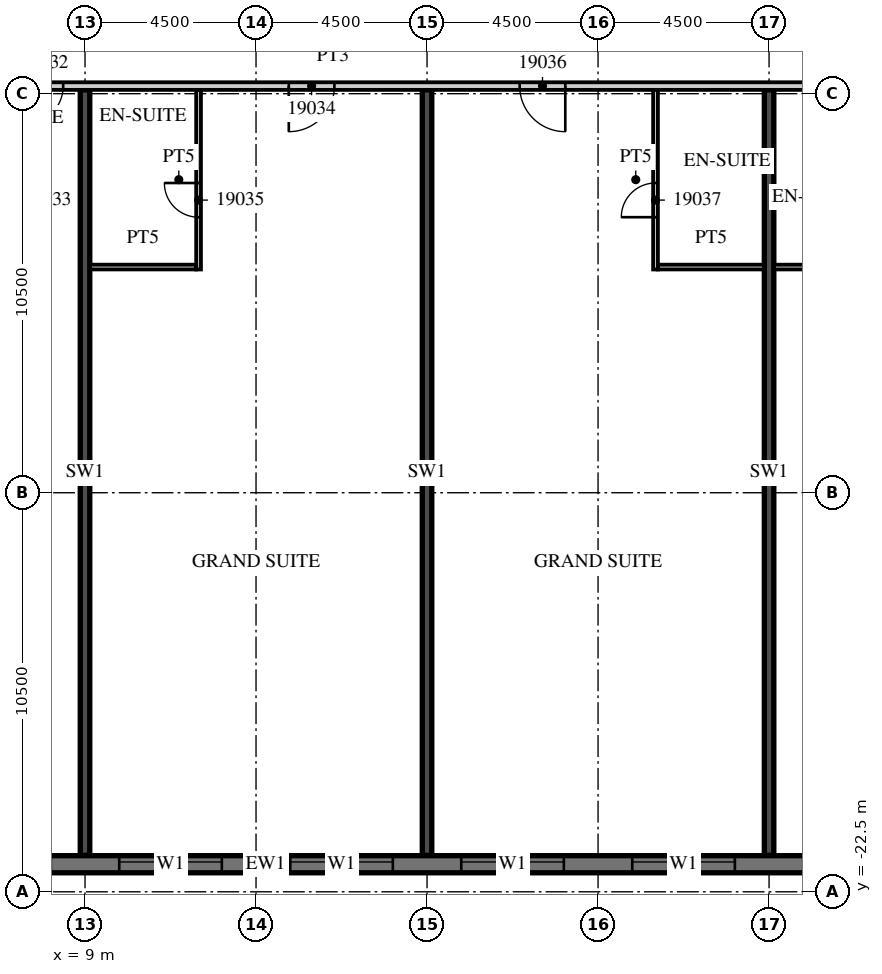
"""IFC4 building model, lengths in metres.
Left out: names, types, materials, properties, quantities, classifications, styles, units other than length and angle.
Written with IfcOpenShell. Run it as: python <this file> out.ifc"""

import sys

from ifc_helpers import new_model, si_unit, direction, frame, frame_2d, origin, place, context, subcontext, project, spatial, rectangle, extrude, element, fill, save


model = new_model("IFC4")
c1 = context("Model", 3, precision=1e-05, world=origin(), true_north=direction((0.0, 1.0)))
c2 = subcontext(c1, "Body", "Model", "MODEL_VIEW")
j1 = project(units=[si_unit("LENGTHUNIT", "METRE"), si_unit("PLANEANGLEUNIT", "RADIAN")], contexts=[c1])
p1 = place(None, origin())
s1 = spatial("IfcSite", under=j1, at=p1, CompositionType="ELEMENT")
p2 = place(p1, origin())
s2 = spatial("IfcBuilding", under=s1, at=p2, CompositionType="ELEMENT")
p3 = place(p2, frame((0.0, 0.0, 93.0)))
s3 = spatial("IfcBuildingStorey", under=s2, at=p3, CompositionType="ELEMENT", Elevation=93.0)
for number, where, z_axis, x_axis in (
    (1, (9.0, -21.54, 0.0), (0.0, 0.0, 1.0), (0.0, 1.0, 0.0)),
    (2, (18.0, -21.54, 0.0), (0.0, 0.0, 1.0), (0.0, 1.0, 0.0)),
    (3, (27.0, -21.54, 0.0), (0.0, 0.0, 1.0), (0.0, 1.0, 0.0)),
):
    element("IfcWall", number, at=place(p3, frame(where, z_axis=z_axis, x_axis=x_axis)), inside=s3, PredefinedType="SHEAR", context=c2, shape_type="SweptSolid", body=[
        extrude(rectangle(XDim=20.14, YDim=0.25, at=frame_2d((10.07, 0.0))), origin(), (0.0, 0.0, 1.0), 3.3),
    ])
p4 = place(p3, frame((-13.5, -21.775, 0.0), z_axis=(0.0, 0.0, 1.0), x_axis=(1.0, 0.0, 0.0)))
e4 = element("IfcWall", 4, at=p4, inside=s3, PredefinedType="SOLIDWALL", context=c2, shape_type="SweptSolid", body=[
    extrude(rectangle(XDim=54.5, YDim=0.45, at=frame_2d((27.25, 0.0))), origin(), (0.0, 0.0, 1.0), 3.02),
])
p5 = place(p4, frame((0.9, 0.0, 0.45)))
e5 = element("IfcOpeningElement", 5, at=p5, cuts=e4, PredefinedType="OPENING", context=c2, shape_type="SweptSolid", body=[
    extrude(rectangle(XDim=2.7, YDim=2.25, at=frame_2d((1.35, 1.125))), frame((0.0, 0.235, 0.0), z_axis=(0.0, -1.0, 0.0), x_axis=(1.0, 0.0, 0.0)), (0.0, 0.0, 1.0), 0.47),
])
p6 = place(p4, frame((5.4, 0.0, 0.45)))
e6 = element("IfcOpeningElement", 6, at=p6, cuts=e4, PredefinedType="OPENING", context=c2, shape_type="SweptSolid", body=[
    extrude(rectangle(XDim=2.7, YDim=2.25, at=frame_2d((1.35, 1.125))), frame((0.0, 0.235, 0.0), z_axis=(0.0, -1.0, 0.0), x_axis=(1.0, 0.0, 0.0)), (0.0, 0.0, 1.0), 0.47),
])
p7 = place(p4, frame((9.9, 0.0, 0.45)))
e7 = element("IfcOpeningElement", 7, at=p7, cuts=e4, PredefinedType="OPENING", context=c2, shape_type="SweptSolid", body=[
    extrude(rectangle(XDim=2.7, YDim=2.25, at=frame_2d((1.35, 1.125))), frame((0.0, 0.235, 0.0), z_axis=(0.0, -1.0, 0.0), x_axis=(1.0, 0.0, 0.0)), (0.0, 0.0, 1.0), 0.47),
])
p8 = place(p4, frame((14.4, 0.0, 0.45)))
e8 = element("IfcOpeningElement", 8, at=p8, cuts=e4, PredefinedType="OPENING", context=c2, shape_type="SweptSolid", body=[
    extrude(rectangle(XDim=2.7, YDim=2.25, at=frame_2d((1.35, 1.125))), frame((0.0, 0.235, 0.0), z_axis=(0.0, -1.0, 0.0), x_axis=(1.0, 0.0, 0.0)), (0.0, 0.0, 1.0), 0.47),
])
p9 = place(p4, frame((18.9, 0.0, 0.45)))
e9 = element("IfcOpeningElement", 9, at=p9, cuts=e4, PredefinedType="OPENING", context=c2, shape_type="SweptSolid", body=[
    extrude(rectangle(XDim=2.7, YDim=2.25, at=frame_2d((1.35, 1.125))), frame((0.0, 0.235, 0.0), z_axis=(0.0, -1.0, 0.0), x_axis=(1.0, 0.0, 0.0)), (0.0, 0.0, 1.0), 0.47),
])
p10 = place(p4, frame((23.4, 0.0, 0.45)))
e10 = element("IfcOpeningElement", 10, at=p10, cuts=e4, PredefinedType="OPENING", context=c2, shape_type="SweptSolid", body=[
    extrude(rectangle(XDim=2.7, YDim=2.25, at=frame_2d((1.35, 1.125))), frame((0.0, 0.235, 0.0), z_axis=(0.0, -1.0, 0.0), x_axis=(1.0, 0.0, 0.0)), (0.0, 0.0, 1.0), 0.47),
])
p11 = place(p4, frame((27.9, 0.0, 0.45)))
e11 = element("IfcOpeningElement", 11, at=p11, cuts=e4, PredefinedType="OPENING", context=c2, shape_type="SweptSolid", body=[
    extrude(rectangle(XDim=2.7, YDim=2.25, at=frame_2d((1.35, 1.125))), frame((0.0, 0.235, 0.0), z_axis=(0.0, -1.0, 0.0), x_axis=(1.0, 0.0, 0.0)), (0.0, 0.0, 1.0), 0.47),
])
p12 = place(p4, frame((32.4, 0.0, 0.45)))
e12 = element("IfcOpeningElement", 12, at=p12, cuts=e4, PredefinedType="OPENING", context=c2, shape_type="SweptSolid", body=[
    extrude(rectangle(XDim=2.7, YDim=2.25, at=frame_2d((1.35, 1.125))), frame((0.0, 0.235, 0.0), z_axis=(0.0, -1.0, 0.0), x_axis=(1.0, 0.0, 0.0)), (0.0, 0.0, 1.0), 0.47),
])
p13 = place(p4, frame((36.9, 0.0, 0.45)))
e13 = element("IfcOpeningElement", 13, at=p13, cuts=e4, PredefinedType="OPENING", context=c2, shape_type="SweptSolid", body=[
    extrude(rectangle(XDim=2.7, YDim=2.25, at=frame_2d((1.35, 1.125))), frame((0.0, 0.235, 0.0), z_axis=(0.0, -1.0, 0.0), x_axis=(1.0, 0.0, 0.0)), (0.0, 0.0, 1.0), 0.47),
])
p14 = place(p4, frame((41.4, 0.0, 0.45)))
e14 = element("IfcOpeningElement", 14, at=p14, cuts=e4, PredefinedType="OPENING", context=c2, shape_type="SweptSolid", body=[
    extrude(rectangle(XDim=2.7, YDim=2.25, at=frame_2d((1.35, 1.125))), frame((0.0, 0.235, 0.0), z_axis=(0.0, -1.0, 0.0), x_axis=(1.0, 0.0, 0.0)), (0.0, 0.0, 1.0), 0.47),
])
p15 = place(p4, frame((45.9, 0.0, 0.45)))
e15 = element("IfcOpeningElement", 15, at=p15, cuts=e4, PredefinedType="OPENING", context=c2, shape_type="SweptSolid", body=[
    extrude(rectangle(XDim=2.7, YDim=2.25, at=frame_2d((1.35, 1.125))), frame((0.0, 0.235, 0.0), z_axis=(0.0, -1.0, 0.0), x_axis=(1.0, 0.0, 0.0)), (0.0, 0.0, 1.0), 0.47),
])
p16 = place(p4, frame((50.4, 0.0, 0.45)))
e16 = element("IfcOpeningElement", 16, at=p16, cuts=e4, PredefinedType="OPENING", context=c2, shape_type="SweptSolid", body=[
    extrude(rectangle(XDim=2.7, YDim=2.25, at=frame_2d((1.35, 1.125))), frame((0.0, 0.235, 0.0), z_axis=(0.0, -1.0, 0.0), x_axis=(1.0, 0.0, 0.0)), (0.0, 0.0, 1.0), 0.47),
])
p17 = place(p3, frame((-13.5, -1.3, 0.0), z_axis=(0.0, 0.0, 1.0), x_axis=(1.0, 0.0, 0.0)))
e17 = element("IfcWall", 17, at=p17, inside=s3, PredefinedType="PARTITIONING", context=c2, shape_type="SweptSolid", body=[
    extrude(rectangle(XDim=58.05, YDim=0.2, at=frame_2d((29.025, 0.0))), origin(), (0.0, 0.0, 1.0), 3.02),
])
p18 = place(p17, frame((0.575, 0.0, 0.0)))
e18 = element("IfcOpeningElement", 18, at=p18, cuts=e17, PredefinedType="OPENING", context=c2, shape_type="SweptSolid", body=[
    extrude(rectangle(XDim=1.0, YDim=2.1, at=frame_2d((0.5, 1.05))), frame((0.0, 0.11, 0.0), z_axis=(0.0, -1.0, 0.0), x_axis=(1.0, 0.0, 0.0)), (0.0, 0.0, 1.0), 0.22),
])
p19 = place(p17, frame((7.45, 0.0, 0.0)))
e19 = element("IfcOpeningElement", 19, at=p19, cuts=e17, PredefinedType="OPENING", context=c2, shape_type="SweptSolid", body=[
    extrude(rectangle(XDim=1.0, YDim=2.1, at=frame_2d((0.5, 1.05))), frame((0.0, 0.11, 0.0), z_axis=(0.0, -1.0, 0.0), x_axis=(1.0, 0.0, 0.0)), (0.0, 0.0, 1.0), 0.22),
])
p20 = place(p17, frame((11.925, 0.0, 0.0)))
e20 = element("IfcOpeningElement", 20, at=p20, cuts=e17, PredefinedType="OPENING", context=c2, shape_type="SweptSolid", body=[
    extrude(rectangle(XDim=1.0, YDim=2.1, at=frame_2d((0.5, 1.05))), frame((0.0, 0.11, 0.0), z_axis=(0.0, -1.0, 0.0), x_axis=(1.0, 0.0, 0.0)), (0.0, 0.0, 1.0), 0.22),
])
p21 = place(p17, frame((14.075, 0.0, 0.0)))
e21 = element("IfcOpeningElement", 21, at=p21, cuts=e17, PredefinedType="OPENING", context=c2, shape_type="SweptSolid", body=[
    extrude(rectangle(XDim=1.0, YDim=2.1, at=frame_2d((0.5, 1.05))), frame((0.0, 0.11, 0.0), z_axis=(0.0, -1.0, 0.0), x_axis=(1.0, 0.0, 0.0)), (0.0, 0.0, 1.0), 0.22),
])
p22 = place(p17, frame((20.925, 0.0, 0.0)))
e22 = element("IfcOpeningElement", 22, at=p22, cuts=e17, PredefinedType="OPENING", context=c2, shape_type="SweptSolid", body=[
    extrude(rectangle(XDim=1.0, YDim=2.1, at=frame_2d((0.5, 1.05))), frame((0.0, 0.11, 0.0), z_axis=(0.0, -1.0, 0.0), x_axis=(1.0, 0.0, 0.0)), (0.0, 0.0, 1.0), 0.22),
])
p23 = place(p17, frame((27.862, 0.0, 0.0)))
e23 = element("IfcOpeningElement", 23, at=p23, cuts=e17, PredefinedType="OPENING", context=c2, shape_type="SweptSolid", body=[
    extrude(rectangle(XDim=1.2, YDim=2.1, at=frame_2d((0.6, 1.05))), frame((0.0, 0.11, 0.0), z_axis=(0.0, -1.0, 0.0), x_axis=(1.0, 0.0, 0.0)), (0.0, 0.0, 1.0), 0.22),
])
p24 = place(p17, frame((33.938, 0.0, 0.0)))
e24 = element("IfcOpeningElement", 24, at=p24, cuts=e17, PredefinedType="OPENING", context=c2, shape_type="SweptSolid", body=[
    extrude(rectangle(XDim=1.2, YDim=2.1, at=frame_2d((0.6, 1.05))), frame((0.0, 0.11, 0.0), z_axis=(0.0, -1.0, 0.0), x_axis=(1.0, 0.0, 0.0)), (0.0, 0.0, 1.0), 0.22),
])
p25 = place(p17, frame((45.862, 0.0, 0.0)))
e25 = element("IfcOpeningElement", 25, at=p25, cuts=e17, PredefinedType="OPENING", context=c2, shape_type="SweptSolid", body=[
    extrude(rectangle(XDim=1.2, YDim=2.1, at=frame_2d((0.6, 1.05))), frame((0.0, 0.11, 0.0), z_axis=(0.0, -1.0, 0.0), x_axis=(1.0, 0.0, 0.0)), (0.0, 0.0, 1.0), 0.22),
])
p26 = place(p17, frame((52.425, 0.0, 0.0)))
e26 = element("IfcOpeningElement", 26, at=p26, cuts=e17, PredefinedType="OPENING", context=c2, shape_type="SweptSolid", body=[
    extrude(rectangle(XDim=1.0, YDim=2.1, at=frame_2d((0.5, 1.05))), frame((0.0, 0.11, 0.0), z_axis=(0.0, -1.0, 0.0), x_axis=(1.0, 0.0, 0.0)), (0.0, 0.0, 1.0), 0.22),
])
p27 = place(p17, frame((56.525, 0.0, 0.0)))
e27 = element("IfcOpeningElement", 27, at=p27, cuts=e17, PredefinedType="OPENING", context=c2, shape_type="SweptSolid", body=[
    extrude(rectangle(XDim=1.0, YDim=2.1, at=frame_2d((0.5, 1.05))), frame((0.0, 0.11, 0.0), z_axis=(0.0, -1.0, 0.0), x_axis=(1.0, 0.0, 0.0)), (0.0, 0.0, 1.0), 0.22),
])
p28 = place(p3, frame((11.988, -6.125, 0.0), z_axis=(0.0, 0.0, 1.0), x_axis=(0.0, 1.0, 0.0)))
e28 = element("IfcWall", 28, at=p28, inside=s3, PredefinedType="PARTITIONING", context=c2, shape_type="SweptSolid", body=[
    extrude(rectangle(XDim=4.725, YDim=0.125, at=frame_2d((2.363, 0.0))), origin(), (0.0, 0.0, 1.0), 3.02),
])
p29 = place(p28, frame((1.375, 0.0, 0.0)))
e29 = element("IfcOpeningElement", 29, at=p29, cuts=e28, PredefinedType="OPENING", context=c2, shape_type="SweptSolid", body=[
    extrude(rectangle(XDim=0.9, YDim=2.1, at=frame_2d((0.45, 1.05))), frame((0.0, 0.073, 0.0), z_axis=(0.0, -1.0, 0.0), x_axis=(1.0, 0.0, 0.0)), (0.0, 0.0, 1.0), 0.145),
])
p30 = place(p3, frame((9.125, -6.062, 0.0), z_axis=(0.0, 0.0, 1.0), x_axis=(1.0, 0.0, 0.0)))
e30 = element("IfcWall", 30, at=p30, inside=s3, PredefinedType="PARTITIONING", context=c2, shape_type="SweptSolid", body=[
    extrude(rectangle(XDim=2.8, YDim=0.125, at=frame_2d((1.4, 0.0))), origin(), (0.0, 0.0, 1.0), 3.02),
])
p31 = place(p3, frame((24.012, -6.125, 0.0), z_axis=(0.0, 0.0, 1.0), x_axis=(0.0, 1.0, 0.0)))
e31 = element("IfcWall", 31, at=p31, inside=s3, PredefinedType="PARTITIONING", context=c2, shape_type="SweptSolid", body=[
    extrude(rectangle(XDim=4.725, YDim=0.125, at=frame_2d((2.363, 0.0))), origin(), (0.0, 0.0, 1.0), 3.02),
])
p32 = place(p31, frame((1.375, 0.0, 0.0)))
e32 = element("IfcOpeningElement", 32, at=p32, cuts=e31, PredefinedType="OPENING", context=c2, shape_type="SweptSolid", body=[
    extrude(rectangle(XDim=0.9, YDim=2.1, at=frame_2d((0.45, 1.05))), frame((0.0, 0.073, 0.0), z_axis=(0.0, -1.0, 0.0), x_axis=(1.0, 0.0, 0.0)), (0.0, 0.0, 1.0), 0.145),
])
for number, where, z_axis, x_axis in (
    (33, (24.075, -6.062, 0.0), (0.0, 0.0, 1.0), (1.0, 0.0, 0.0)),
    (34, (27.125, -6.062, 0.0), (0.0, 0.0, 1.0), (1.0, 0.0, 0.0)),
):
    element("IfcWall", number, at=place(p3, frame(where, z_axis=z_axis, x_axis=x_axis)), inside=s3, PredefinedType="PARTITIONING", context=c2, shape_type="SweptSolid", body=[
        extrude(rectangle(XDim=2.8, YDim=0.125, at=frame_2d((1.4, 0.0))), origin(), (0.0, 0.0, 1.0), 3.02),
    ])
p33 = place(p10, origin())
e35 = element("IfcWindow", 35, at=p33, inside=s3, PartitioningType="SINGLE_PANEL", PredefinedType="WINDOW", context=c2, shape_type="SweptSolid", body=[
    extrude(rectangle(XDim=2.7, YDim=2.25, at=frame_2d((1.35, 1.125))), frame((0.0, 0.09, 0.0), z_axis=(0.0, -1.0, 0.0), x_axis=(1.0, 0.0, 0.0)), (0.0, 0.0, 1.0), 0.06),
])
fill(e10, e35)
p34 = place(p11, origin())
e36 = element("IfcWindow", 36, at=p34, inside=s3, PartitioningType="SINGLE_PANEL", PredefinedType="WINDOW", context=c2, shape_type="SweptSolid", body=[
    extrude(rectangle(XDim=2.7, YDim=2.25, at=frame_2d((1.35, 1.125))), frame((0.0, 0.09, 0.0), z_axis=(0.0, -1.0, 0.0), x_axis=(1.0, 0.0, 0.0)), (0.0, 0.0, 1.0), 0.06),
])
fill(e11, e36)
p35 = place(p12, origin())
e37 = element("IfcWindow", 37, at=p35, inside=s3, PartitioningType="SINGLE_PANEL", PredefinedType="WINDOW", context=c2, shape_type="SweptSolid", body=[
    extrude(rectangle(XDim=2.7, YDim=2.25, at=frame_2d((1.35, 1.125))), frame((0.0, 0.09, 0.0), z_axis=(0.0, -1.0, 0.0), x_axis=(1.0, 0.0, 0.0)), (0.0, 0.0, 1.0), 0.06),
])
fill(e12, e37)
p36 = place(p13, origin())
e38 = element("IfcWindow", 38, at=p36, inside=s3, PartitioningType="SINGLE_PANEL", PredefinedType="WINDOW", context=c2, shape_type="SweptSolid", body=[
    extrude(rectangle(XDim=2.7, YDim=2.25, at=frame_2d((1.35, 1.125))), frame((0.0, 0.09, 0.0), z_axis=(0.0, -1.0, 0.0), x_axis=(1.0, 0.0, 0.0)), (0.0, 0.0, 1.0), 0.06),
])
fill(e13, e38)
p37 = place(p22, origin())
e39 = element("IfcDoor", 39, at=p37, inside=s3, OperationType="SINGLE_SWING_LEFT", PredefinedType="DOOR", context=c2, shape_type="SweptSolid", body=[
    extrude(rectangle(XDim=1.0, YDim=2.1, at=frame_2d((0.5, 1.05))), frame((0.0, 0.025, 0.0), z_axis=(0.0, -1.0, 0.0), x_axis=(1.0, 0.0, 0.0)), (0.0, 0.0, 1.0), 0.05),
])
fill(e22, e39)
p38 = place(p23, origin())
e40 = element("IfcDoor", 40, at=p38, inside=s3, OperationType="SINGLE_SWING_LEFT", PredefinedType="DOOR", context=c2, shape_type="SweptSolid", body=[
    extrude(rectangle(XDim=1.2, YDim=2.1, at=frame_2d((0.6, 1.05))), frame((0.0, 0.025, 0.0), z_axis=(0.0, -1.0, 0.0), x_axis=(1.0, 0.0, 0.0)), (0.0, 0.0, 1.0), 0.05),
])
fill(e23, e40)
p39 = place(p29, origin())
e41 = element("IfcDoor", 41, at=p39, inside=s3, OperationType="SINGLE_SWING_RIGHT", PredefinedType="DOOR", context=c2, shape_type="SweptSolid", body=[
    extrude(rectangle(XDim=0.9, YDim=2.1, at=frame_2d((0.45, 1.05))), frame((0.0, 0.025, 0.0), z_axis=(0.0, -1.0, 0.0), x_axis=(1.0, 0.0, 0.0)), (0.0, 0.0, 1.0), 0.05),
])
fill(e29, e41)
p40 = place(p24, origin())
e42 = element("IfcDoor", 42, at=p40, inside=s3, OperationType="SINGLE_SWING_RIGHT", PredefinedType="DOOR", context=c2, shape_type="SweptSolid", body=[
    extrude(rectangle(XDim=1.2, YDim=2.1, at=frame_2d((0.6, 1.05))), frame((0.0, 0.025, 0.0), z_axis=(0.0, -1.0, 0.0), x_axis=(1.0, 0.0, 0.0)), (0.0, 0.0, 1.0), 0.05),
])
fill(e24, e42)
p41 = place(p32, origin())
e43 = element("IfcDoor", 43, at=p41, inside=s3, OperationType="SINGLE_SWING_LEFT", PredefinedType="DOOR", context=c2, shape_type="SweptSolid", body=[
    extrude(rectangle(XDim=0.9, YDim=2.1, at=frame_2d((0.45, 1.05))), frame((0.0, 0.025, 0.0), z_axis=(0.0, -1.0, 0.0), x_axis=(1.0, 0.0, 0.0)), (0.0, 0.0, 1.0), 0.05),
])
fill(e32, e43)
save(model, sys.argv[1])
